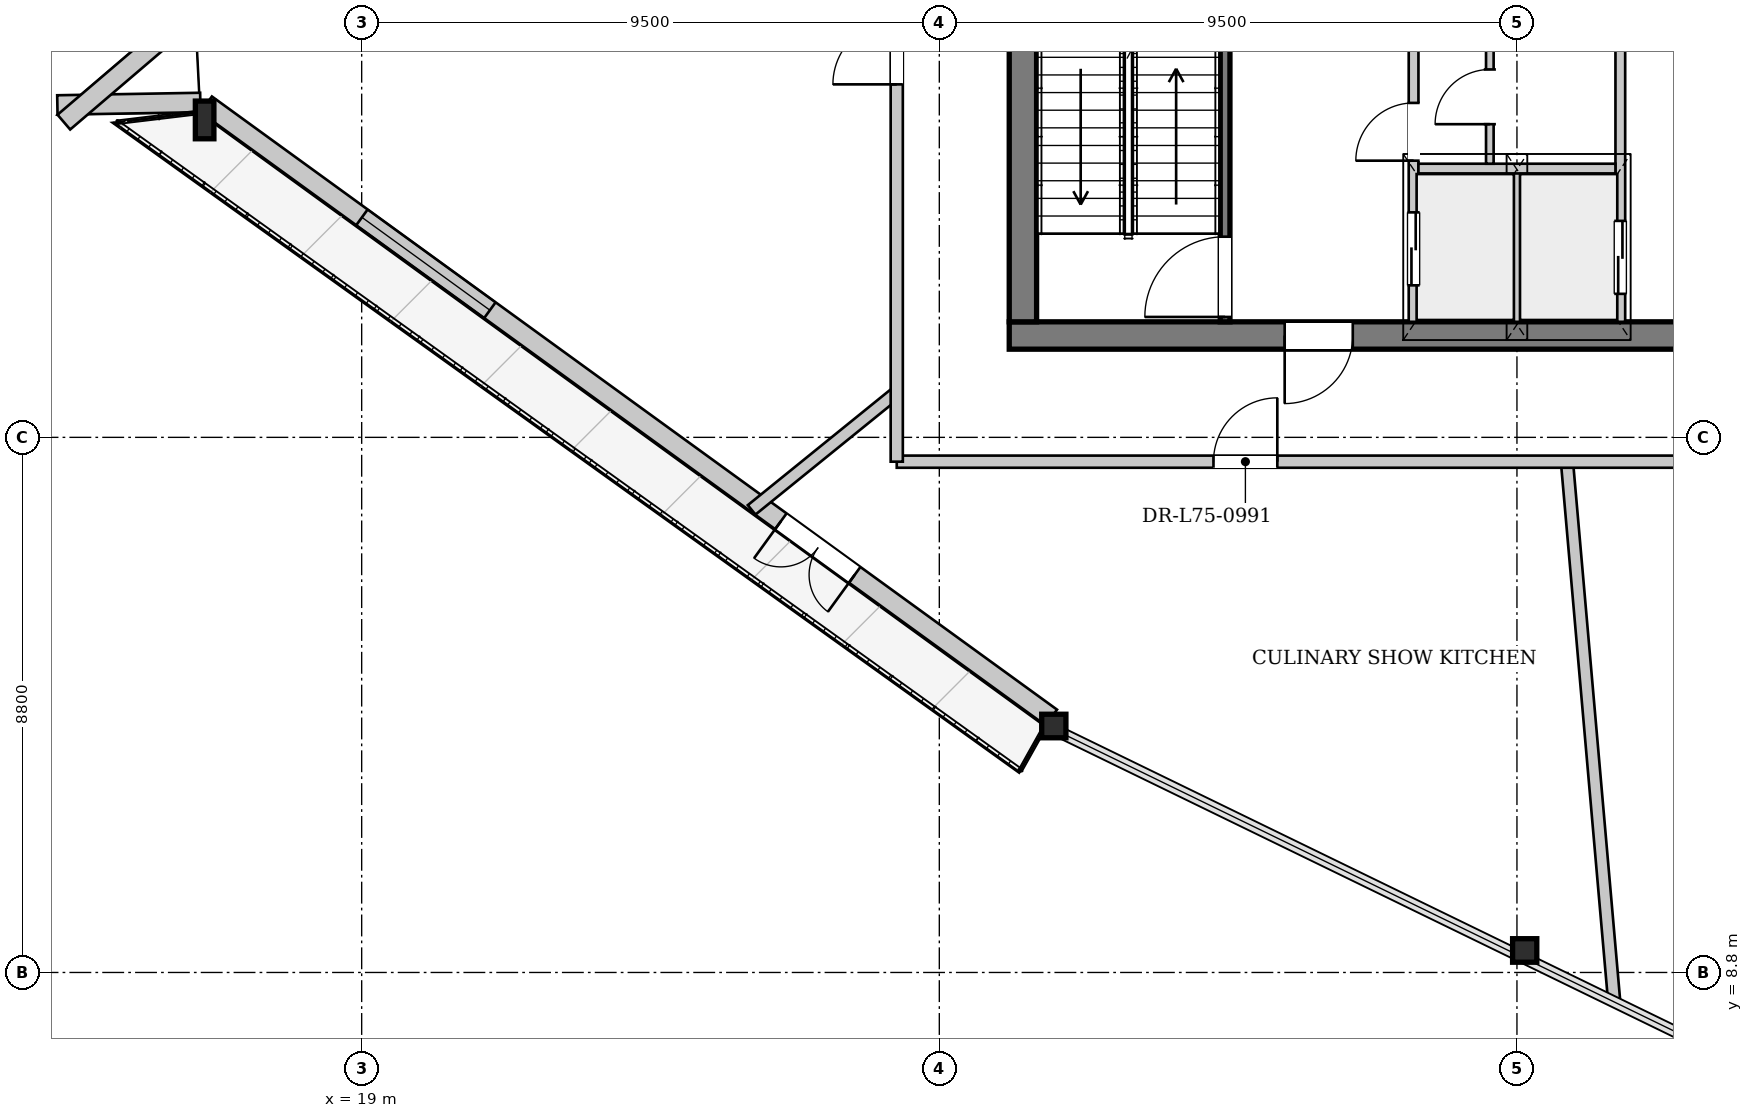
"""IFC4 building model, lengths in metres.
Left out: names, types, materials, properties, quantities, classifications, styles, units other than length and angle.
Written with IfcOpenShell. Run it as: python <this file> out.ifc"""

import sys

from ifc_helpers import new_model, si_unit, direction, frame, frame_2d, origin, origin_2d, place, context, subcontext, project, spatial, rectangle, i_section, extrude, source, transform, mapped, element, fill, save


model = new_model("IFC4")
c1 = context("Model", 3, precision=1e-05, world=origin(), true_north=direction((0.0, 1.0)))
c2 = subcontext(c1, "Body", "Model", "MODEL_VIEW")
j1 = project(units=[si_unit("LENGTHUNIT", "METRE"), si_unit("PLANEANGLEUNIT", "RADIAN")], contexts=[c1])
p1 = place(None, origin())
s1 = spatial("IfcSite", under=j1, at=p1, CompositionType="ELEMENT")
p2 = place(p1, origin())
s2 = spatial("IfcBuilding", under=s1, at=p2, CompositionType="ELEMENT")
p3 = place(p2, frame((0.0, 0.0, 281.9)))
s3 = spatial("IfcBuildingStorey", under=s2, at=p3, CompositionType="ELEMENT", Elevation=281.9)
m1 = source(origin(), c2, "Body", "SweptSolid", [
    extrude(i_section(OverallWidth=0.305, OverallDepth=0.62, WebThickness=0.021, FlangeThickness=0.04, at=origin_2d()), origin(), (0.0, 0.0, 1.0), 3.946),
])
p4 = place(p3, frame((16.349, 22.947, 0.0), z_axis=(0.034527375469, -0.064290220632, 0.997333759518), x_axis=(0.880987884191, 0.473138825196, 0.0)))
e1 = element("IfcColumn", 1, at=p4, inside=s3, PredefinedType="COLUMN", context=c2, shape_type="MappedRepresentation", body=[
    mapped(m1, transform((0.0, 0.0, 0.0), x_axis=(1.0, 0.0, 0.0), y_axis=(0.0, 1.0, 0.0), z_axis=(0.0, 0.0, 1.0), scale=1.0)),
])
m2 = source(origin(), c2, "Body", "SweptSolid", [
    extrude(i_section(OverallWidth=0.398, OverallDepth=0.387, WebThickness=0.019, FlangeThickness=0.029, at=origin_2d()), origin(), (0.0, 0.0, 1.0), 3.944),
])
p5 = place(p3, frame((30.248, 12.864, 0.0), z_axis=(0.068518591156, -0.005323034182, 0.997635638885), x_axis=(0.077454064379, 0.996995921712, 0.0)))
e2 = element("IfcColumn", 2, at=p5, inside=s3, PredefinedType="COLUMN", context=c2, shape_type="MappedRepresentation", body=[
    mapped(m2, transform((0.0, 0.0, 0.0), x_axis=(1.0, 0.0, 0.0), y_axis=(0.0, 1.0, 0.0), z_axis=(0.0, 0.0, 1.0), scale=1.0)),
])
m3 = source(origin(), c2, "Body", "SweptSolid", [
    extrude(i_section(OverallWidth=0.398, OverallDepth=0.387, WebThickness=0.019, FlangeThickness=0.029, at=origin_2d()), origin(), (0.0, 0.0, 1.0), 3.949),
])
p6 = place(p3, frame((37.969, 9.108, 0.0), z_axis=(0.080241513705, 0.02720051312, 0.996404251077), x_axis=(-0.321039281158, 0.947065879416, 0.0)))
e3 = element("IfcColumn", 3, at=p6, inside=s3, PredefinedType="COLUMN", context=c2, shape_type="MappedRepresentation", body=[
    mapped(m3, transform((0.0, 0.0, 0.0), x_axis=(1.0, 0.0, 0.0), y_axis=(0.0, 1.0, 0.0), z_axis=(0.0, 0.0, 1.0), scale=1.0)),
])
p7 = place(p3, frame((30.342, 12.993, 0.0), z_axis=(0.0, 0.0, 1.0), x_axis=(-0.80942781076, 0.587219396111, 0.0)))
e4 = element("IfcWall", 4, at=p7, inside=s3, PredefinedType="SOLIDWALL", context=c2, shape_type="SweptSolid", body=[
    extrude(rectangle(XDim=17.172, YDim=0.32, at=frame_2d((8.586, 0.0))), origin(), (0.0, 0.0, 1.0), 3.462),
])
p8 = place(p7, frame((3.995, 0.0, 0.0)))
e5 = element("IfcOpeningElement", 5, at=p8, cuts=e4, PredefinedType="OPENING", context=c2, shape_type="SweptSolid", body=[
    extrude(rectangle(XDim=1.5, YDim=2.3, at=frame_2d((0.75, 1.15))), frame((0.0, 0.17, 0.0), z_axis=(0.0, -1.0, 0.0), x_axis=(1.0, 0.0, 0.0)), (0.0, 0.0, 1.0), 0.34),
])
p9 = place(p7, frame((11.407, 0.0, 0.65)))
e6 = element("IfcOpeningElement", 6, at=p9, cuts=e4, PredefinedType="OPENING", context=c2, shape_type="SweptSolid", body=[
    extrude(rectangle(XDim=2.6, YDim=2.35, at=frame_2d((1.3, 1.175))), frame((0.0, 0.17, 0.0), z_axis=(0.0, -1.0, 0.0), x_axis=(1.0, 0.0, 0.0)), (0.0, 0.0, 1.0), 0.34),
])
p10 = place(p3, frame((16.346, 23.107, 0.0), z_axis=(0.0, 0.0, 1.0), x_axis=(-0.99984786229, -0.01744282875, 0.0)))
e7 = element("IfcWall", 7, at=p10, inside=s3, PredefinedType="SOLIDWALL", context=c2, shape_type="SweptSolid", body=[
    extrude(rectangle(XDim=2.351, YDim=0.32, at=frame_2d((1.176, 0.0))), origin(), (0.0, 0.0, 1.0), 3.462),
])
p11 = place(p3, frame((14.102, 22.784, 0.0), z_axis=(0.0, 0.0, 1.0), x_axis=(0.760365209759, 0.649495764257, 0.0)))
e8 = element("IfcWall", 8, at=p11, inside=s3, PredefinedType="SOLIDWALL", context=c2, shape_type="SweptSolid", body=[
    extrude(rectangle(XDim=2.966, YDim=0.32, at=frame_2d((1.483, 0.0))), origin(), (0.0, 0.0, 1.0), 3.462),
])
p12 = place(p3, frame((46.35, 19.275, 0.0), z_axis=(0.0, 0.0, 1.0), x_axis=(-1.0, 0.0, 0.0)))
e9 = element("IfcWall", 9, at=p12, inside=s3, PredefinedType="SHEAR", context=c2, shape_type="SweptSolid", body=[
    extrude(rectangle(XDim=16.7, YDim=0.45, at=frame_2d((8.35, 0.0))), origin(), (0.0, 0.0, 1.0), 3.92),
])
p13 = place(p12, frame((4.55, 0.0, 0.0)))
e10 = element("IfcOpeningElement", 10, at=p13, cuts=e9, PredefinedType="OPENING", context=c2, shape_type="SweptSolid", body=[
    extrude(rectangle(XDim=1.12, YDim=2.25, at=frame_2d((0.56, 1.125))), frame((0.0, 0.235, 0.0), z_axis=(0.0, -1.0, 0.0), x_axis=(1.0, 0.0, 0.0)), (0.0, 0.0, 1.0), 0.47),
])
p14 = place(p12, frame((11.05, 0.0, 0.0)))
e11 = element("IfcOpeningElement", 11, at=p14, cuts=e9, PredefinedType="OPENING", context=c2, shape_type="SweptSolid", body=[
    extrude(rectangle(XDim=1.12, YDim=2.25, at=frame_2d((0.56, 1.125))), frame((0.0, 0.235, 0.0), z_axis=(0.0, -1.0, 0.0), x_axis=(1.0, 0.0, 0.0)), (0.0, 0.0, 1.0), 0.47),
])
p15 = place(p3, frame((29.875, 19.5, 0.0), z_axis=(0.0, 0.0, 1.0), x_axis=(0.0, 1.0, 0.0)))
e12 = element("IfcWall", 12, at=p15, inside=s3, PredefinedType="SHEAR", context=c2, shape_type="SweptSolid", body=[
    extrude(rectangle(XDim=14.2, YDim=0.45, at=frame_2d((7.1, 0.0))), origin(), (0.0, 0.0, 1.0), 3.92),
])
p16 = place(p15, frame((7.42, 0.0, 0.0)))
e13 = element("IfcOpeningElement", 13, at=p16, cuts=e12, PredefinedType="OPENING", context=c2, shape_type="SweptSolid", body=[
    extrude(rectangle(XDim=1.6, YDim=2.2, at=frame_2d((0.8, 1.1))), frame((0.0, 0.235, 0.0), z_axis=(0.0, -1.0, 0.0), x_axis=(1.0, 0.0, 0.0)), (0.0, 0.0, 1.0), 0.47),
])
p17 = place(p3, frame((33.2, 19.5, 0.0), z_axis=(0.0, 0.0, 1.0), x_axis=(0.0, 1.0, 0.0)))
e14 = element("IfcWall", 14, at=p17, inside=s3, PredefinedType="PARTITIONING", context=c2, shape_type="SweptSolid", body=[
    extrude(rectangle(XDim=7.46, YDim=0.16, at=frame_2d((3.73, 0.0))), origin(), (0.0, 0.0, 1.0), 3.92),
])
p18 = place(p17, frame((0.08, 0.0, 0.0)))
e15 = element("IfcOpeningElement", 15, at=p18, cuts=e14, PredefinedType="OPENING", context=c2, shape_type="SweptSolid", body=[
    extrude(rectangle(XDim=1.32, YDim=2.2, at=frame_2d((0.66, 1.1))), frame((0.0, 0.09, 0.0), z_axis=(0.0, -1.0, 0.0), x_axis=(1.0, 0.0, 0.0)), (0.0, 0.0, 1.0), 0.18),
])
p19 = place(p3, frame((36.3, 19.5, 0.0), z_axis=(0.0, 0.0, 1.0), x_axis=(0.0, 1.0, 0.0)))
e16 = element("IfcWall", 16, at=p19, inside=s3, PredefinedType="PARTITIONING", context=c2, shape_type="SweptSolid", body=[
    extrude(rectangle(XDim=4.78, YDim=0.16, at=frame_2d((2.39, 0.0))), origin(), (0.0, 0.0, 1.0), 3.92),
])
p20 = place(p19, frame((0.6, 0.0, 0.0)))
e17 = element("IfcOpeningElement", 17, at=p20, cuts=e16, PredefinedType="OPENING", context=c2, shape_type="SweptSolid", body=[
    extrude(rectangle(XDim=1.2, YDim=2.2, at=frame_2d((0.6, 1.1))), frame((0.0, 0.09, 0.0), z_axis=(0.0, -1.0, 0.0), x_axis=(1.0, 0.0, 0.0)), (0.0, 0.0, 1.0), 0.18),
])
p21 = place(p19, frame((2.65, 0.0, 0.0)))
e18 = element("IfcOpeningElement", 18, at=p21, cuts=e16, PredefinedType="OPENING", context=c2, shape_type="SweptSolid", body=[
    extrude(rectangle(XDim=0.95, YDim=2.1, at=frame_2d((0.475, 1.05))), frame((0.0, 0.09, 0.0), z_axis=(0.0, -1.0, 0.0), x_axis=(1.0, 0.0, 0.0)), (0.0, 0.0, 1.0), 0.18),
])
p22 = place(p3, frame((39.7, 24.28, 0.0), z_axis=(0.0, 0.0, 1.0), x_axis=(0.0, -1.0, 0.0)))
e19 = element("IfcWall", 19, at=p22, inside=s3, PredefinedType="PARTITIONING", context=c2, shape_type="SweptSolid", body=[
    extrude(rectangle(XDim=4.78, YDim=0.16, at=frame_2d((2.39, 0.0))), origin(), (0.0, 0.0, 1.0), 3.92),
])
p23 = place(p22, frame((3.12, 0.0, 0.0)))
e20 = element("IfcOpeningElement", 20, at=p23, cuts=e19, PredefinedType="OPENING", context=c2, shape_type="SweptSolid", body=[
    extrude(rectangle(XDim=1.2, YDim=2.2, at=frame_2d((0.6, 1.1))), frame((0.0, 0.09, 0.0), z_axis=(0.0, -1.0, 0.0), x_axis=(1.0, 0.0, 0.0)), (0.0, 0.0, 1.0), 0.18),
])
p24 = place(p3, frame((38.0, 19.5, 0.0), z_axis=(0.0, 0.0, 1.0), x_axis=(0.0, 1.0, 0.0)))
e21 = element("IfcWall", 21, at=p24, inside=s3, PredefinedType="PARTITIONING", context=c2, shape_type="SweptSolid", body=[
    extrude(rectangle(XDim=2.46, YDim=0.125, at=frame_2d((1.23, 0.0))), origin(), (0.0, 0.0, 1.0), 3.92),
])
p25 = place(p3, frame((36.38, 22.02, 0.0), z_axis=(0.0, 0.0, 1.0), x_axis=(1.0, 0.0, 0.0)))
e22 = element("IfcWall", 22, at=p25, inside=s3, PredefinedType="PARTITIONING", context=c2, shape_type="SweptSolid", body=[
    extrude(rectangle(XDim=3.24, YDim=0.16, at=frame_2d((1.62, 0.0))), origin(), (0.0, 0.0, 1.0), 3.92),
])
p26 = place(p3, frame((37.554, 22.1, 0.0), z_axis=(0.0, 0.0, 1.0), x_axis=(0.0, 1.0, 0.0)))
e23 = element("IfcWall", 23, at=p26, inside=s3, PredefinedType="PARTITIONING", context=c2, shape_type="SweptSolid", body=[
    extrude(rectangle(XDim=2.18, YDim=0.125, at=frame_2d((1.09, 0.0))), origin(), (0.0, 0.0, 1.0), 3.92),
])
p27 = place(p26, frame((0.65, 0.0, 0.0)))
e24 = element("IfcOpeningElement", 24, at=p27, cuts=e23, PredefinedType="OPENING", context=c2, shape_type="SweptSolid", body=[
    extrude(rectangle(XDim=0.9, YDim=2.1, at=frame_2d((0.45, 1.05))), frame((0.0, 0.073, 0.0), z_axis=(0.0, -1.0, 0.0), x_axis=(1.0, 0.0, 0.0)), (0.0, 0.0, 1.0), 0.145),
])
p28 = place(p3, frame((27.8, 18.34, 0.0), z_axis=(0.0, 0.0, 1.0), x_axis=(-0.777170804973, -0.629289710625, 0.0)))
e25 = element("IfcWall", 25, at=p28, inside=s3, PredefinedType="PARTITIONING", context=c2, shape_type="SweptSolid", body=[
    extrude(rectangle(XDim=3.071, YDim=0.2, at=frame_2d((1.535, 0.0))), origin(), (0.0, 0.0, 1.0), 3.92),
])
p29 = place(p3, frame((38.823, 17.2, 0.0), z_axis=(0.0, 0.0, 1.0), x_axis=(0.087143086854, -0.996195805258, 0.0)))
e26 = element("IfcWall", 26, at=p29, inside=s3, PredefinedType="PARTITIONING", context=c2, shape_type="SweptSolid", body=[
    extrude(rectangle(XDim=8.884, YDim=0.2, at=frame_2d((4.442, 0.0))), origin(), (0.0, 0.0, 1.0), 3.92),
])
p30 = place(p3, frame((27.8, 17.2, 0.0), z_axis=(0.0, 0.0, 1.0), x_axis=(1.0, 0.0, 0.0)))
e27 = element("IfcWall", 27, at=p30, inside=s3, PredefinedType="PARTITIONING", context=c2, shape_type="SweptSolid", body=[
    extrude(rectangle(XDim=20.4, YDim=0.2, at=frame_2d((10.2, 0.0))), origin(), (0.0, 0.0, 1.0), 3.92),
])
p31 = place(p30, frame((5.209, 0.0, 0.0)))
e28 = element("IfcOpeningElement", 28, at=p31, cuts=e27, PredefinedType="OPENING", context=c2, shape_type="SweptSolid", body=[
    extrude(rectangle(XDim=1.05, YDim=2.2, at=frame_2d((0.525, 1.1))), frame((0.0, 0.11, 0.0), z_axis=(0.0, -1.0, 0.0), x_axis=(1.0, 0.0, 0.0)), (0.0, 0.0, 1.0), 0.22),
])
p32 = place(p30, frame((15.339, 0.0, 0.0)))
e29 = element("IfcOpeningElement", 29, at=p32, cuts=e27, PredefinedType="OPENING", context=c2, shape_type="SweptSolid", body=[
    extrude(rectangle(XDim=1.05, YDim=2.2, at=frame_2d((0.525, 1.1))), frame((0.0, 0.11, 0.0), z_axis=(0.0, -1.0, 0.0), x_axis=(1.0, 0.0, 0.0)), (0.0, 0.0, 1.0), 0.22),
])
p33 = place(p3, frame((27.8, 17.2, 0.0), z_axis=(0.0, 0.0, 1.0), x_axis=(0.0, 1.0, 0.0)))
e30 = element("IfcWall", 30, at=p33, inside=s3, PredefinedType="PARTITIONING", context=c2, shape_type="SweptSolid", body=[
    extrude(rectangle(XDim=17.544, YDim=0.2, at=frame_2d((8.772, 0.0))), origin(), (0.0, 0.0, 1.0), 3.92),
])
p34 = place(p33, frame((6.205, 0.0, 0.0)))
e31 = element("IfcOpeningElement", 31, at=p34, cuts=e30, PredefinedType="OPENING", context=c2, shape_type="SweptSolid", body=[
    extrude(rectangle(XDim=1.05, YDim=2.2, at=frame_2d((0.525, 1.1))), frame((0.0, 0.11, 0.0), z_axis=(0.0, -1.0, 0.0), x_axis=(1.0, 0.0, 0.0)), (0.0, 0.0, 1.0), 0.22),
])
m4 = source(origin(), c2, "Body", "SweptSolid", [
    extrude(rectangle(XDim=1.5, YDim=2.3, at=frame_2d((0.75, 1.15))), frame((0.0, 0.025, 0.0), z_axis=(0.0, -1.0, 0.0), x_axis=(1.0, 0.0, 0.0)), (0.0, 0.0, 1.0), 0.05),
])
p35 = place(p8, origin())
e32 = element("IfcDoor", 32, at=p35, inside=s3, OperationType="DOUBLE_DOOR_SINGLE_SWING", PredefinedType="DOOR", context=c2, shape_type="MappedRepresentation", body=[
    mapped(m4, transform((0.0, 0.0, 0.0), x_axis=(1.0, 0.0, 0.0), y_axis=(0.0, 1.0, 0.0), z_axis=(0.0, 0.0, 1.0), scale=1.0)),
])
fill(e5, e32)
m5 = source(origin(), c2, "Body", "SweptSolid", [
    extrude(rectangle(XDim=2.6, YDim=2.35, at=frame_2d((1.3, 1.175))), frame((0.0, 0.03, 0.0), z_axis=(0.0, -1.0, 0.0), x_axis=(1.0, 0.0, 0.0)), (0.0, 0.0, 1.0), 0.06),
])
p36 = place(p9, origin())
e33 = element("IfcWindow", 33, at=p36, inside=s3, PartitioningType="SINGLE_PANEL", PredefinedType="WINDOW", context=c2, shape_type="MappedRepresentation", body=[
    mapped(m5, transform((0.0, 0.0, 0.0), x_axis=(1.0, 0.0, 0.0), y_axis=(0.0, 1.0, 0.0), z_axis=(0.0, 0.0, 1.0), scale=1.0)),
])
fill(e6, e33)
m6 = source(origin(), c2, "Body", "SweptSolid", [
    extrude(rectangle(XDim=1.12, YDim=2.25, at=frame_2d((0.56, 1.125))), frame((0.0, 0.025, 0.0), z_axis=(0.0, -1.0, 0.0), x_axis=(1.0, 0.0, 0.0)), (0.0, 0.0, 1.0), 0.05),
])
p37 = place(p14, origin())
e34 = element("IfcDoor", 34, at=p37, inside=s3, OperationType="SINGLE_SWING_RIGHT", PredefinedType="DOOR", context=c2, shape_type="MappedRepresentation", body=[
    mapped(m6, transform((0.0, 0.0, 0.0), x_axis=(1.0, 0.0, 0.0), y_axis=(0.0, 1.0, 0.0), z_axis=(0.0, 0.0, 1.0), scale=1.0)),
])
fill(e11, e34)
m7 = source(origin(), c2, "Body", "SweptSolid", [
    extrude(rectangle(XDim=1.32, YDim=2.2, at=frame_2d((0.66, 1.1))), frame((0.0, 0.025, 0.0), z_axis=(0.0, -1.0, 0.0), x_axis=(1.0, 0.0, 0.0)), (0.0, 0.0, 1.0), 0.05),
])
p38 = place(p18, origin())
e35 = element("IfcDoor", 35, at=p38, inside=s3, OperationType="SINGLE_SWING_LEFT", PredefinedType="DOOR", context=c2, shape_type="MappedRepresentation", body=[
    mapped(m7, transform((0.0, 0.0, 0.0), x_axis=(1.0, 0.0, 0.0), y_axis=(0.0, 1.0, 0.0), z_axis=(0.0, 0.0, 1.0), scale=1.0)),
])
fill(e15, e35)
m8 = source(origin(), c2, "Body", "SweptSolid", [
    extrude(rectangle(XDim=1.2, YDim=2.2, at=frame_2d((0.6, 1.1))), frame((0.0, 0.025, 0.0), z_axis=(0.0, -1.0, 0.0), x_axis=(1.0, 0.0, 0.0)), (0.0, 0.0, 1.0), 0.05),
])
p39 = place(p20, origin())
e36 = element("IfcDoor", 36, at=p39, inside=s3, OperationType="DOUBLE_DOOR_SLIDING", PredefinedType="DOOR", context=c2, shape_type="MappedRepresentation", body=[
    mapped(m8, transform((0.0, 0.0, 0.0), x_axis=(1.0, 0.0, 0.0), y_axis=(0.0, 1.0, 0.0), z_axis=(0.0, 0.0, 1.0), scale=1.0)),
])
fill(e17, e36)
m9 = source(origin(), c2, "Body", "SweptSolid", [
    extrude(rectangle(XDim=0.95, YDim=2.1, at=frame_2d((0.475, 1.05))), frame((0.0, 0.025, 0.0), z_axis=(0.0, -1.0, 0.0), x_axis=(1.0, 0.0, 0.0)), (0.0, 0.0, 1.0), 0.05),
])
p40 = place(p21, origin())
e37 = element("IfcDoor", 37, at=p40, inside=s3, OperationType="SINGLE_SWING_LEFT", PredefinedType="DOOR", context=c2, shape_type="MappedRepresentation", body=[
    mapped(m9, transform((0.0, 0.0, 0.0), x_axis=(1.0, 0.0, 0.0), y_axis=(0.0, 1.0, 0.0), z_axis=(0.0, 0.0, 1.0), scale=1.0)),
])
fill(e18, e37)
m10 = source(origin(), c2, "Body", "SweptSolid", [
    extrude(rectangle(XDim=0.9, YDim=2.1, at=frame_2d((0.45, 1.05))), frame((0.0, 0.025, 0.0), z_axis=(0.0, -1.0, 0.0), x_axis=(1.0, 0.0, 0.0)), (0.0, 0.0, 1.0), 0.05),
])
p41 = place(p27, origin())
e38 = element("IfcDoor", 38, at=p41, inside=s3, OperationType="SINGLE_SWING_LEFT", PredefinedType="DOOR", context=c2, shape_type="MappedRepresentation", body=[
    mapped(m10, transform((0.0, 0.0, 0.0), x_axis=(1.0, 0.0, 0.0), y_axis=(0.0, 1.0, 0.0), z_axis=(0.0, 0.0, 1.0), scale=1.0)),
])
fill(e24, e38)
p42 = place(p23, origin())
e39 = element("IfcDoor", 39, at=p42, inside=s3, OperationType="DOUBLE_DOOR_SLIDING", PredefinedType="DOOR", context=c2, shape_type="MappedRepresentation", body=[
    mapped(m8, transform((0.0, 0.0, 0.0), x_axis=(1.0, 0.0, 0.0), y_axis=(0.0, 1.0, 0.0), z_axis=(0.0, 0.0, 1.0), scale=1.0)),
])
fill(e20, e39)
m11 = source(origin(), c2, "Body", "SweptSolid", [
    extrude(rectangle(XDim=1.05, YDim=2.2, at=frame_2d((0.525, 1.1))), frame((0.0, 0.025, 0.0), z_axis=(0.0, -1.0, 0.0), x_axis=(1.0, 0.0, 0.0)), (0.0, 0.0, 1.0), 0.05),
])
p43 = place(p31, origin())
e40 = element("IfcDoor", 40, at=p43, inside=s3, OperationType="SINGLE_SWING_RIGHT", PredefinedType="DOOR", context=c2, shape_type="MappedRepresentation", body=[
    mapped(m11, transform((0.0, 0.0, 0.0), x_axis=(1.0, 0.0, 0.0), y_axis=(0.0, 1.0, 0.0), z_axis=(0.0, 0.0, 1.0), scale=1.0)),
])
fill(e28, e40)
p44 = place(p34, origin())
e41 = element("IfcDoor", 41, at=p44, inside=s3, OperationType="SINGLE_SWING_LEFT", PredefinedType="DOOR", context=c2, shape_type="MappedRepresentation", body=[
    mapped(m11, transform((0.0, 0.0, 0.0), x_axis=(1.0, 0.0, 0.0), y_axis=(0.0, 1.0, 0.0), z_axis=(0.0, 0.0, 1.0), scale=1.0)),
])
fill(e31, e41)
save(model, sys.argv[1])
